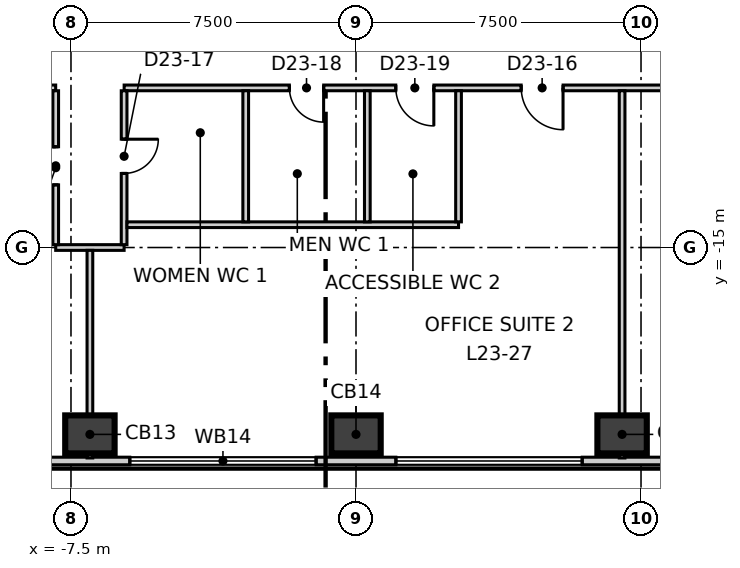
"""IFC4 building model, lengths in metres.
Left out: names, types, materials, properties, quantities, classifications, styles, units other than length and angle.
Written with IfcOpenShell. Run it as: python <this file> out.ifc"""

import sys

from ifc_helpers import new_model, si_unit, direction, frame, frame_2d, origin, origin_2d, place, context, subcontext, project, spatial, rectangle, extrude, element, fill, save


model = new_model("IFC4")
c1 = context("Model", 3, precision=1e-05, world=origin(), true_north=direction((0.0, 1.0)))
c2 = subcontext(c1, "Body", "Model", "MODEL_VIEW")
j1 = project(units=[si_unit("LENGTHUNIT", "METRE"), si_unit("PLANEANGLEUNIT", "RADIAN")], contexts=[c1])
p1 = place(None, origin())
s1 = spatial("IfcSite", under=j1, at=p1, CompositionType="ELEMENT")
p2 = place(p1, origin())
s2 = spatial("IfcBuilding", under=s1, at=p2, CompositionType="ELEMENT")
p3 = place(p2, frame((0.0, 0.0, 104.3)))
s3 = spatial("IfcBuildingStorey", under=s2, at=p3, CompositionType="ELEMENT", Elevation=104.3)
for number, where, z_axis, x_axis in (
    (1, (-7.002, -19.917, -0.3), (0.0, 0.0, 1.0), (1.0, 0.0, 0.0)),
    (2, (0.0, -19.917, -0.3), (0.0, 0.0, 1.0), (1.0, 0.0, 0.0)),
    (3, (7.002, -19.917, -0.3), (0.0, 0.0, 1.0), (1.0, 0.0, 0.0)),
):
    element("IfcColumn", number, at=place(p3, frame(where, z_axis=z_axis, x_axis=x_axis)), inside=s3, PredefinedType="COLUMN", context=c2, shape_type="SweptSolid", body=[
        extrude(rectangle(XDim=1.3, YDim=1.0, at=origin_2d()), origin(), (0.0, 0.0, 1.0), 4.0),
    ])
p4 = place(p3, frame((-3.2, 35.691, 0.0), z_axis=(0.0, 0.0, 1.0), x_axis=(-0.500010127185, -0.866019556773, 0.0)))
e4 = element("IfcWall", 4, at=p4, inside=s3, PredefinedType="ELEMENTEDWALL", context=c2, shape_type="SweptSolid", body=[
    extrude(rectangle(XDim=58.599, YDim=0.2, at=frame_2d((29.299, 0.0))), origin(), (0.0, 0.0, 1.0), 3.7),
])
p5 = place(p4, frame((2.353, 0.0, 0.9)))
e5 = element("IfcOpeningElement", 5, at=p5, cuts=e4, PredefinedType="OPENING", context=c2, shape_type="SweptSolid", body=[
    extrude(rectangle(XDim=4.9, YDim=2.5, at=frame_2d((2.45, 1.25))), frame((0.0, 0.11, 0.0), z_axis=(0.0, -1.0, 0.0), x_axis=(1.0, 0.0, 0.0)), (0.0, 0.0, 1.0), 0.22),
])
p6 = place(p4, frame((9.355, 0.0, 0.9)))
e6 = element("IfcOpeningElement", 6, at=p6, cuts=e4, PredefinedType="OPENING", context=c2, shape_type="SweptSolid", body=[
    extrude(rectangle(XDim=4.9, YDim=2.5, at=frame_2d((2.45, 1.25))), frame((0.0, 0.11, 0.0), z_axis=(0.0, -1.0, 0.0), x_axis=(1.0, 0.0, 0.0)), (0.0, 0.0, 1.0), 0.22),
])
p7 = place(p4, frame((16.357, 0.0, 0.9)))
e7 = element("IfcOpeningElement", 7, at=p7, cuts=e4, PredefinedType="OPENING", context=c2, shape_type="SweptSolid", body=[
    extrude(rectangle(XDim=4.9, YDim=2.5, at=frame_2d((2.45, 1.25))), frame((0.0, 0.11, 0.0), z_axis=(0.0, -1.0, 0.0), x_axis=(1.0, 0.0, 0.0)), (0.0, 0.0, 1.0), 0.22),
])
p8 = place(p4, frame((23.358, 0.0, 0.9)))
e8 = element("IfcOpeningElement", 8, at=p8, cuts=e4, PredefinedType="OPENING", context=c2, shape_type="SweptSolid", body=[
    extrude(rectangle(XDim=4.9, YDim=2.5, at=frame_2d((2.45, 1.25))), frame((0.0, 0.11, 0.0), z_axis=(0.0, -1.0, 0.0), x_axis=(1.0, 0.0, 0.0)), (0.0, 0.0, 1.0), 0.22),
])
p9 = place(p4, frame((30.36, 0.0, 0.9)))
e9 = element("IfcOpeningElement", 9, at=p9, cuts=e4, PredefinedType="OPENING", context=c2, shape_type="SweptSolid", body=[
    extrude(rectangle(XDim=4.9, YDim=2.5, at=frame_2d((2.45, 1.25))), frame((0.0, 0.11, 0.0), z_axis=(0.0, -1.0, 0.0), x_axis=(1.0, 0.0, 0.0)), (0.0, 0.0, 1.0), 0.22),
])
p10 = place(p4, frame((37.362, 0.0, 0.9)))
e10 = element("IfcOpeningElement", 10, at=p10, cuts=e4, PredefinedType="OPENING", context=c2, shape_type="SweptSolid", body=[
    extrude(rectangle(XDim=4.9, YDim=2.5, at=frame_2d((2.45, 1.25))), frame((0.0, 0.11, 0.0), z_axis=(0.0, -1.0, 0.0), x_axis=(1.0, 0.0, 0.0)), (0.0, 0.0, 1.0), 0.22),
])
p11 = place(p4, frame((44.363, 0.0, 0.9)))
e11 = element("IfcOpeningElement", 11, at=p11, cuts=e4, PredefinedType="OPENING", context=c2, shape_type="SweptSolid", body=[
    extrude(rectangle(XDim=4.9, YDim=2.5, at=frame_2d((2.45, 1.25))), frame((0.0, 0.11, 0.0), z_axis=(0.0, -1.0, 0.0), x_axis=(1.0, 0.0, 0.0)), (0.0, 0.0, 1.0), 0.22),
])
p12 = place(p4, frame((51.365, 0.0, 0.9)))
e12 = element("IfcOpeningElement", 12, at=p12, cuts=e4, PredefinedType="OPENING", context=c2, shape_type="SweptSolid", body=[
    extrude(rectangle(XDim=4.9, YDim=2.5, at=frame_2d((2.45, 1.25))), frame((0.0, 0.11, 0.0), z_axis=(0.0, -1.0, 0.0), x_axis=(1.0, 0.0, 0.0)), (0.0, 0.0, 1.0), 0.22),
])
p13 = place(p3, frame((-29.31, -20.617, 0.0), z_axis=(0.0, 0.0, 1.0), x_axis=(1.0, 0.0, 0.0)))
e13 = element("IfcWall", 13, at=p13, inside=s3, PredefinedType="ELEMENTEDWALL", context=c2, shape_type="SweptSolid", body=[
    extrude(rectangle(XDim=58.6, YDim=0.2, at=frame_2d((29.3, 0.0))), origin(), (0.0, 0.0, 1.0), 3.7),
])
p14 = place(p13, frame((2.354, 0.0, 0.9)))
e14 = element("IfcOpeningElement", 14, at=p14, cuts=e13, PredefinedType="OPENING", context=c2, shape_type="SweptSolid", body=[
    extrude(rectangle(XDim=4.9, YDim=2.5, at=frame_2d((2.45, 1.25))), frame((0.0, 0.11, 0.0), z_axis=(0.0, -1.0, 0.0), x_axis=(1.0, 0.0, 0.0)), (0.0, 0.0, 1.0), 0.22),
])
p15 = place(p13, frame((9.356, 0.0, 0.9)))
e15 = element("IfcOpeningElement", 15, at=p15, cuts=e13, PredefinedType="OPENING", context=c2, shape_type="SweptSolid", body=[
    extrude(rectangle(XDim=4.9, YDim=2.5, at=frame_2d((2.45, 1.25))), frame((0.0, 0.11, 0.0), z_axis=(0.0, -1.0, 0.0), x_axis=(1.0, 0.0, 0.0)), (0.0, 0.0, 1.0), 0.22),
])
p16 = place(p13, frame((16.357, 0.0, 0.9)))
e16 = element("IfcOpeningElement", 16, at=p16, cuts=e13, PredefinedType="OPENING", context=c2, shape_type="SweptSolid", body=[
    extrude(rectangle(XDim=4.9, YDim=2.5, at=frame_2d((2.45, 1.25))), frame((0.0, 0.11, 0.0), z_axis=(0.0, -1.0, 0.0), x_axis=(1.0, 0.0, 0.0)), (0.0, 0.0, 1.0), 0.22),
])
p17 = place(p13, frame((23.359, 0.0, 0.9)))
e17 = element("IfcOpeningElement", 17, at=p17, cuts=e13, PredefinedType="OPENING", context=c2, shape_type="SweptSolid", body=[
    extrude(rectangle(XDim=4.9, YDim=2.5, at=frame_2d((2.45, 1.25))), frame((0.0, 0.11, 0.0), z_axis=(0.0, -1.0, 0.0), x_axis=(1.0, 0.0, 0.0)), (0.0, 0.0, 1.0), 0.22),
])
p18 = place(p13, frame((30.361, 0.0, 0.9)))
e18 = element("IfcOpeningElement", 18, at=p18, cuts=e13, PredefinedType="OPENING", context=c2, shape_type="SweptSolid", body=[
    extrude(rectangle(XDim=4.9, YDim=2.5, at=frame_2d((2.45, 1.25))), frame((0.0, 0.11, 0.0), z_axis=(0.0, -1.0, 0.0), x_axis=(1.0, 0.0, 0.0)), (0.0, 0.0, 1.0), 0.22),
])
p19 = place(p13, frame((37.363, 0.0, 0.9)))
e19 = element("IfcOpeningElement", 19, at=p19, cuts=e13, PredefinedType="OPENING", context=c2, shape_type="SweptSolid", body=[
    extrude(rectangle(XDim=4.9, YDim=2.5, at=frame_2d((2.45, 1.25))), frame((0.0, 0.11, 0.0), z_axis=(0.0, -1.0, 0.0), x_axis=(1.0, 0.0, 0.0)), (0.0, 0.0, 1.0), 0.22),
])
p20 = place(p13, frame((44.364, 0.0, 0.9)))
e20 = element("IfcOpeningElement", 20, at=p20, cuts=e13, PredefinedType="OPENING", context=c2, shape_type="SweptSolid", body=[
    extrude(rectangle(XDim=4.9, YDim=2.5, at=frame_2d((2.45, 1.25))), frame((0.0, 0.11, 0.0), z_axis=(0.0, -1.0, 0.0), x_axis=(1.0, 0.0, 0.0)), (0.0, 0.0, 1.0), 0.22),
])
p21 = place(p13, frame((51.366, 0.0, 0.9)))
e21 = element("IfcOpeningElement", 21, at=p21, cuts=e13, PredefinedType="OPENING", context=c2, shape_type="SweptSolid", body=[
    extrude(rectangle(XDim=4.9, YDim=2.5, at=frame_2d((2.45, 1.25))), frame((0.0, 0.11, 0.0), z_axis=(0.0, -1.0, 0.0), x_axis=(1.0, 0.0, 0.0)), (0.0, 0.0, 1.0), 0.22),
])
p22 = place(p3, frame((32.51, -15.074, 0.0), z_axis=(0.0, 0.0, 1.0), x_axis=(-0.500008323105, 0.866020598384, 0.0)))
e22 = element("IfcWall", 22, at=p22, inside=s3, PredefinedType="ELEMENTEDWALL", context=c2, shape_type="SweptSolid", body=[
    extrude(rectangle(XDim=58.599, YDim=0.2, at=frame_2d((29.3, 0.0))), origin(), (0.0, 0.0, 1.0), 3.7),
])
p23 = place(p22, frame((2.354, 0.0, 0.9)))
e23 = element("IfcOpeningElement", 23, at=p23, cuts=e22, PredefinedType="OPENING", context=c2, shape_type="SweptSolid", body=[
    extrude(rectangle(XDim=4.9, YDim=2.5, at=frame_2d((2.45, 1.25))), frame((0.0, 0.11, 0.0), z_axis=(0.0, -1.0, 0.0), x_axis=(1.0, 0.0, 0.0)), (0.0, 0.0, 1.0), 0.22),
])
p24 = place(p22, frame((9.355, 0.0, 0.9)))
e24 = element("IfcOpeningElement", 24, at=p24, cuts=e22, PredefinedType="OPENING", context=c2, shape_type="SweptSolid", body=[
    extrude(rectangle(XDim=4.9, YDim=2.5, at=frame_2d((2.45, 1.25))), frame((0.0, 0.11, 0.0), z_axis=(0.0, -1.0, 0.0), x_axis=(1.0, 0.0, 0.0)), (0.0, 0.0, 1.0), 0.22),
])
p25 = place(p22, frame((16.357, 0.0, 0.9)))
e25 = element("IfcOpeningElement", 25, at=p25, cuts=e22, PredefinedType="OPENING", context=c2, shape_type="SweptSolid", body=[
    extrude(rectangle(XDim=4.9, YDim=2.5, at=frame_2d((2.45, 1.25))), frame((0.0, 0.11, 0.0), z_axis=(0.0, -1.0, 0.0), x_axis=(1.0, 0.0, 0.0)), (0.0, 0.0, 1.0), 0.22),
])
p26 = place(p22, frame((23.359, 0.0, 0.9)))
e26 = element("IfcOpeningElement", 26, at=p26, cuts=e22, PredefinedType="OPENING", context=c2, shape_type="SweptSolid", body=[
    extrude(rectangle(XDim=4.9, YDim=2.5, at=frame_2d((2.45, 1.25))), frame((0.0, 0.11, 0.0), z_axis=(0.0, -1.0, 0.0), x_axis=(1.0, 0.0, 0.0)), (0.0, 0.0, 1.0), 0.22),
])
p27 = place(p22, frame((30.36, 0.0, 0.9)))
e27 = element("IfcOpeningElement", 27, at=p27, cuts=e22, PredefinedType="OPENING", context=c2, shape_type="SweptSolid", body=[
    extrude(rectangle(XDim=4.9, YDim=2.5, at=frame_2d((2.45, 1.25))), frame((0.0, 0.11, 0.0), z_axis=(0.0, -1.0, 0.0), x_axis=(1.0, 0.0, 0.0)), (0.0, 0.0, 1.0), 0.22),
])
p28 = place(p22, frame((37.362, 0.0, 0.9)))
e28 = element("IfcOpeningElement", 28, at=p28, cuts=e22, PredefinedType="OPENING", context=c2, shape_type="SweptSolid", body=[
    extrude(rectangle(XDim=4.9, YDim=2.5, at=frame_2d((2.45, 1.25))), frame((0.0, 0.11, 0.0), z_axis=(0.0, -1.0, 0.0), x_axis=(1.0, 0.0, 0.0)), (0.0, 0.0, 1.0), 0.22),
])
p29 = place(p22, frame((44.364, 0.0, 0.9)))
e29 = element("IfcOpeningElement", 29, at=p29, cuts=e22, PredefinedType="OPENING", context=c2, shape_type="SweptSolid", body=[
    extrude(rectangle(XDim=4.9, YDim=2.5, at=frame_2d((2.45, 1.25))), frame((0.0, 0.11, 0.0), z_axis=(0.0, -1.0, 0.0), x_axis=(1.0, 0.0, 0.0)), (0.0, 0.0, 1.0), 0.22),
])
p30 = place(p22, frame((51.365, 0.0, 0.9)))
e30 = element("IfcOpeningElement", 30, at=p30, cuts=e22, PredefinedType="OPENING", context=c2, shape_type="SweptSolid", body=[
    extrude(rectangle(XDim=4.9, YDim=2.5, at=frame_2d((2.45, 1.25))), frame((0.0, 0.11, 0.0), z_axis=(0.0, -1.0, 0.0), x_axis=(1.0, 0.0, 0.0)), (0.0, 0.0, 1.0), 0.22),
])
p31 = place(p3, frame((-18.556, -10.8, 0.0), z_axis=(0.0, 0.0, 1.0), x_axis=(1.0, 0.0, 0.0)))
e31 = element("IfcWall", 31, at=p31, inside=s3, PredefinedType="PARTITIONING", context=c2, shape_type="SweptSolid", body=[
    extrude(rectangle(XDim=10.653, YDim=0.15, at=frame_2d((5.326, 0.0))), origin(), (0.0, 0.0, 1.0), 3.7),
])
p32 = place(p31, frame((1.7, 0.0, 0.0)))
e32 = element("IfcOpeningElement", 32, at=p32, cuts=e31, PredefinedType="OPENING", context=c2, shape_type="SweptSolid", body=[
    extrude(rectangle(XDim=1.1, YDim=2.1, at=frame_2d((0.55, 1.05))), frame((0.0, 0.085, 0.0), z_axis=(0.0, -1.0, 0.0), x_axis=(1.0, 0.0, 0.0)), (0.0, 0.0, 1.0), 0.17),
])
p33 = place(p31, frame((5.302, 0.0, 0.0)))
e33 = element("IfcOpeningElement", 33, at=p33, cuts=e31, PredefinedType="OPENING", context=c2, shape_type="SweptSolid", body=[
    extrude(rectangle(XDim=0.9, YDim=2.1, at=frame_2d((0.45, 1.05))), frame((0.0, 0.085, 0.0), z_axis=(0.0, -1.0, 0.0), x_axis=(1.0, 0.0, 0.0)), (0.0, 0.0, 1.0), 0.17),
])
p34 = place(p3, frame((-6.101, -10.8, 0.0), z_axis=(0.0, 0.0, 1.0), x_axis=(1.0, 0.0, 0.0)))
e34 = element("IfcWall", 34, at=p34, inside=s3, PredefinedType="PARTITIONING", context=c2, shape_type="SweptSolid", body=[
    extrude(rectangle(XDim=24.807, YDim=0.15, at=frame_2d((12.404, 0.0))), origin(), (0.0, 0.0, 1.0), 3.7),
])
p35 = place(p34, frame((10.449, 0.0, 0.0)))
e35 = element("IfcOpeningElement", 35, at=p35, cuts=e34, PredefinedType="OPENING", context=c2, shape_type="SweptSolid", body=[
    extrude(rectangle(XDim=1.1, YDim=2.1, at=frame_2d((0.55, 1.05))), frame((0.0, 0.085, 0.0), z_axis=(0.0, -1.0, 0.0), x_axis=(1.0, 0.0, 0.0)), (0.0, 0.0, 1.0), 0.17),
])
p36 = place(p34, frame((4.349, 0.0, 0.0)))
e36 = element("IfcOpeningElement", 36, at=p36, cuts=e34, PredefinedType="OPENING", context=c2, shape_type="SweptSolid", body=[
    extrude(rectangle(XDim=0.9, YDim=2.1, at=frame_2d((0.45, 1.05))), frame((0.0, 0.085, 0.0), z_axis=(0.0, -1.0, 0.0), x_axis=(1.0, 0.0, 0.0)), (0.0, 0.0, 1.0), 0.17),
])
p37 = place(p34, frame((7.149, 0.0, 0.0)))
e37 = element("IfcOpeningElement", 37, at=p37, cuts=e34, PredefinedType="OPENING", context=c2, shape_type="SweptSolid", body=[
    extrude(rectangle(XDim=1.0, YDim=2.1, at=frame_2d((0.5, 1.05))), frame((0.0, 0.085, 0.0), z_axis=(0.0, -1.0, 0.0), x_axis=(1.0, 0.0, 0.0)), (0.0, 0.0, 1.0), 0.17),
])
p38 = place(p34, frame((18.453, 0.0, 0.0)))
e38 = element("IfcOpeningElement", 38, at=p38, cuts=e34, PredefinedType="OPENING", context=c2, shape_type="SweptSolid", body=[
    extrude(rectangle(XDim=1.1, YDim=2.1, at=frame_2d((0.55, 1.05))), frame((0.0, 0.085, 0.0), z_axis=(0.0, -1.0, 0.0), x_axis=(1.0, 0.0, 0.0)), (0.0, 0.0, 1.0), 0.17),
])
p39 = place(p3, frame((-18.631, -10.669, 0.0), z_axis=(0.0, 0.0, 1.0), x_axis=(0.500015596868, 0.866016398741, 0.0)))
e39 = element("IfcWall", 39, at=p39, inside=s3, PredefinedType="PARTITIONING", context=c2, shape_type="SweptSolid", body=[
    extrude(rectangle(XDim=24.656, YDim=0.15, at=frame_2d((12.328, 0.0))), origin(), (0.0, 0.0, 1.0), 3.7),
])
p40 = place(p39, frame((17.507, 0.0, 0.0)))
e40 = element("IfcOpeningElement", 40, at=p40, cuts=e39, PredefinedType="OPENING", context=c2, shape_type="SweptSolid", body=[
    extrude(rectangle(XDim=1.1, YDim=2.1, at=frame_2d((0.55, 1.05))), frame((0.0, 0.085, 0.0), z_axis=(0.0, -1.0, 0.0), x_axis=(1.0, 0.0, 0.0)), (0.0, 0.0, 1.0), 0.17),
])
p41 = place(p39, frame((5.104, 0.0, 0.0)))
e41 = element("IfcOpeningElement", 41, at=p41, cuts=e39, PredefinedType="OPENING", context=c2, shape_type="SweptSolid", body=[
    extrude(rectangle(XDim=1.1, YDim=2.1, at=frame_2d((0.55, 1.05))), frame((0.0, 0.085, 0.0), z_axis=(0.0, -1.0, 0.0), x_axis=(1.0, 0.0, 0.0)), (0.0, 0.0, 1.0), 0.17),
])
p42 = place(p3, frame((-7.902, -15.0, 0.0), z_axis=(0.0, 0.0, 1.0), x_axis=(1.0, 0.0, 0.0)))
e42 = element("IfcWall", 42, at=p42, inside=s3, PredefinedType="PARTITIONING", context=c2, shape_type="SweptSolid", body=[
    extrude(rectangle(XDim=1.8, YDim=0.15, at=frame_2d((0.9, 0.0))), origin(), (0.0, 0.0, 1.0), 3.7),
])
p43 = place(p3, frame((-7.902, -14.925, 0.0), z_axis=(0.0, 0.0, 1.0), x_axis=(0.0, 1.0, 0.0)))
e43 = element("IfcWall", 43, at=p43, inside=s3, PredefinedType="PARTITIONING", context=c2, shape_type="SweptSolid", body=[
    extrude(rectangle(XDim=4.049, YDim=0.15, at=frame_2d((2.024, 0.0))), origin(), (0.0, 0.0, 1.0), 3.7),
])
p44 = place(p43, frame((1.575, 0.0, 0.0)))
e44 = element("IfcOpeningElement", 44, at=p44, cuts=e43, PredefinedType="OPENING", context=c2, shape_type="SweptSolid", body=[
    extrude(rectangle(XDim=1.0, YDim=2.1, at=frame_2d((0.5, 1.05))), frame((0.0, 0.085, 0.0), z_axis=(0.0, -1.0, 0.0), x_axis=(1.0, 0.0, 0.0)), (0.0, 0.0, 1.0), 0.17),
])
p45 = place(p3, frame((-7.002, -20.537, 0.0), z_axis=(0.0, 0.0, 1.0), x_axis=(0.0, 1.0, 0.0)))
e45 = element("IfcWall", 45, at=p45, inside=s3, PredefinedType="PARTITIONING", context=c2, shape_type="SweptSolid", body=[
    extrude(rectangle(XDim=5.462, YDim=0.15, at=frame_2d((2.731, 0.0))), origin(), (0.0, 0.0, 1.0), 3.7),
])
p46 = place(p3, frame((-6.102, -14.925, 0.0), z_axis=(0.0, 0.0, 1.0), x_axis=(0.0, 1.0, 0.0)))
e46 = element("IfcWall", 46, at=p46, inside=s3, PredefinedType="PARTITIONING", context=c2, shape_type="SweptSolid", body=[
    extrude(rectangle(XDim=4.049, YDim=0.15, at=frame_2d((2.024, 0.0))), origin(), (0.0, 0.0, 1.0), 3.7),
])
p47 = place(p46, frame((1.875, 0.0, 0.0)))
e47 = element("IfcOpeningElement", 47, at=p47, cuts=e46, PredefinedType="OPENING", context=c2, shape_type="SweptSolid", body=[
    extrude(rectangle(XDim=0.9, YDim=2.1, at=frame_2d((0.45, 1.05))), frame((0.0, 0.085, 0.0), z_axis=(0.0, -1.0, 0.0), x_axis=(1.0, 0.0, 0.0)), (0.0, 0.0, 1.0), 0.17),
])
p48 = place(p3, frame((-6.027, -14.4, 0.0), z_axis=(0.0, 0.0, 1.0), x_axis=(1.0, 0.0, 0.0)))
e48 = element("IfcWall", 48, at=p48, inside=s3, PredefinedType="PARTITIONING", context=c2, shape_type="SweptSolid", body=[
    extrude(rectangle(XDim=8.725, YDim=0.15, at=frame_2d((4.363, 0.0))), origin(), (0.0, 0.0, 1.0), 3.7),
])
for number, where, z_axis, x_axis in (
    (49, (-2.902, -14.325, 0.0), (0.0, 0.0, 1.0), (0.0, 1.0, 0.0)),
    (50, (2.698, -14.325, 0.0), (0.0, 0.0, 1.0), (0.0, 1.0, 0.0)),
):
    element("IfcWall", number, at=place(p3, frame(where, z_axis=z_axis, x_axis=x_axis)), inside=s3, PredefinedType="PARTITIONING", context=c2, shape_type="SweptSolid", body=[
        extrude(rectangle(XDim=3.45, YDim=0.15, at=frame_2d((1.725, 0.0))), origin(), (0.0, 0.0, 1.0), 3.7),
    ])
p49 = place(p3, frame((0.298, -14.325, 0.0), z_axis=(0.0, 0.0, 1.0), x_axis=(0.0, 1.0, 0.0)))
e51 = element("IfcWall", 51, at=p49, inside=s3, PredefinedType="PARTITIONING", context=c2, shape_type="SweptSolid", body=[
    extrude(rectangle(XDim=3.45, YDim=0.15, at=frame_2d((1.725, 0.0))), origin(), (0.0, 0.0, 1.0), 3.2),
])
p50 = place(p3, frame((7.002, -20.537, 0.0), z_axis=(0.0, 0.0, 1.0), x_axis=(0.0, 1.0, 0.0)))
e52 = element("IfcWall", 52, at=p50, inside=s3, PredefinedType="PARTITIONING", context=c2, shape_type="SweptSolid", body=[
    extrude(rectangle(XDim=9.662, YDim=0.15, at=frame_2d((4.831, 0.0))), origin(), (0.0, 0.0, 1.0), 3.7),
])
p51 = place(p17, origin())
e53 = element("IfcWindow", 53, at=p51, inside=s3, PartitioningType="SINGLE_PANEL", PredefinedType="WINDOW", context=c2, shape_type="SweptSolid", body=[
    extrude(rectangle(XDim=4.9, YDim=2.5, at=frame_2d((2.45, 1.25))), frame((0.0, 0.03, 0.0), z_axis=(0.0, -1.0, 0.0), x_axis=(1.0, 0.0, 0.0)), (0.0, 0.0, 1.0), 0.06),
])
fill(e17, e53)
p52 = place(p18, origin())
e54 = element("IfcWindow", 54, at=p52, inside=s3, PartitioningType="SINGLE_PANEL", PredefinedType="WINDOW", context=c2, shape_type="SweptSolid", body=[
    extrude(rectangle(XDim=4.9, YDim=2.5, at=frame_2d((2.45, 1.25))), frame((0.0, 0.03, 0.0), z_axis=(0.0, -1.0, 0.0), x_axis=(1.0, 0.0, 0.0)), (0.0, 0.0, 1.0), 0.06),
])
fill(e18, e54)
p53 = place(p44, origin())
e55 = element("IfcDoor", 55, at=p53, inside=s3, OperationType="SINGLE_SWING_LEFT", PredefinedType="DOOR", context=c2, shape_type="SweptSolid", body=[
    extrude(rectangle(XDim=1.0, YDim=2.1, at=frame_2d((0.5, 1.05))), frame((0.0, 0.025, 0.0), z_axis=(0.0, -1.0, 0.0), x_axis=(1.0, 0.0, 0.0)), (0.0, 0.0, 1.0), 0.05),
])
fill(e44, e55)
p54 = place(p35, origin())
e56 = element("IfcDoor", 56, at=p54, inside=s3, OperationType="SINGLE_SWING_RIGHT", PredefinedType="DOOR", context=c2, shape_type="SweptSolid", body=[
    extrude(rectangle(XDim=1.1, YDim=2.1, at=frame_2d((0.55, 1.05))), frame((0.0, 0.025, 0.0), z_axis=(0.0, -1.0, 0.0), x_axis=(1.0, 0.0, 0.0)), (0.0, 0.0, 1.0), 0.05),
])
fill(e35, e56)
p55 = place(p47, origin())
e57 = element("IfcDoor", 57, at=p55, inside=s3, OperationType="SINGLE_SWING_RIGHT", PredefinedType="DOOR", context=c2, shape_type="SweptSolid", body=[
    extrude(rectangle(XDim=0.9, YDim=2.1, at=frame_2d((0.45, 1.05))), frame((0.0, 0.025, 0.0), z_axis=(0.0, -1.0, 0.0), x_axis=(1.0, 0.0, 0.0)), (0.0, 0.0, 1.0), 0.05),
])
fill(e47, e57)
p56 = place(p36, origin())
e58 = element("IfcDoor", 58, at=p56, inside=s3, OperationType="SINGLE_SWING_RIGHT", PredefinedType="DOOR", context=c2, shape_type="SweptSolid", body=[
    extrude(rectangle(XDim=0.9, YDim=2.1, at=frame_2d((0.45, 1.05))), frame((0.0, 0.025, 0.0), z_axis=(0.0, -1.0, 0.0), x_axis=(1.0, 0.0, 0.0)), (0.0, 0.0, 1.0), 0.05),
])
fill(e36, e58)
p57 = place(p37, origin())
e59 = element("IfcDoor", 59, at=p57, inside=s3, OperationType="SINGLE_SWING_RIGHT", PredefinedType="DOOR", context=c2, shape_type="SweptSolid", body=[
    extrude(rectangle(XDim=1.0, YDim=2.1, at=frame_2d((0.5, 1.05))), frame((0.0, 0.025, 0.0), z_axis=(0.0, -1.0, 0.0), x_axis=(1.0, 0.0, 0.0)), (0.0, 0.0, 1.0), 0.05),
])
fill(e37, e59)
save(model, sys.argv[1])
